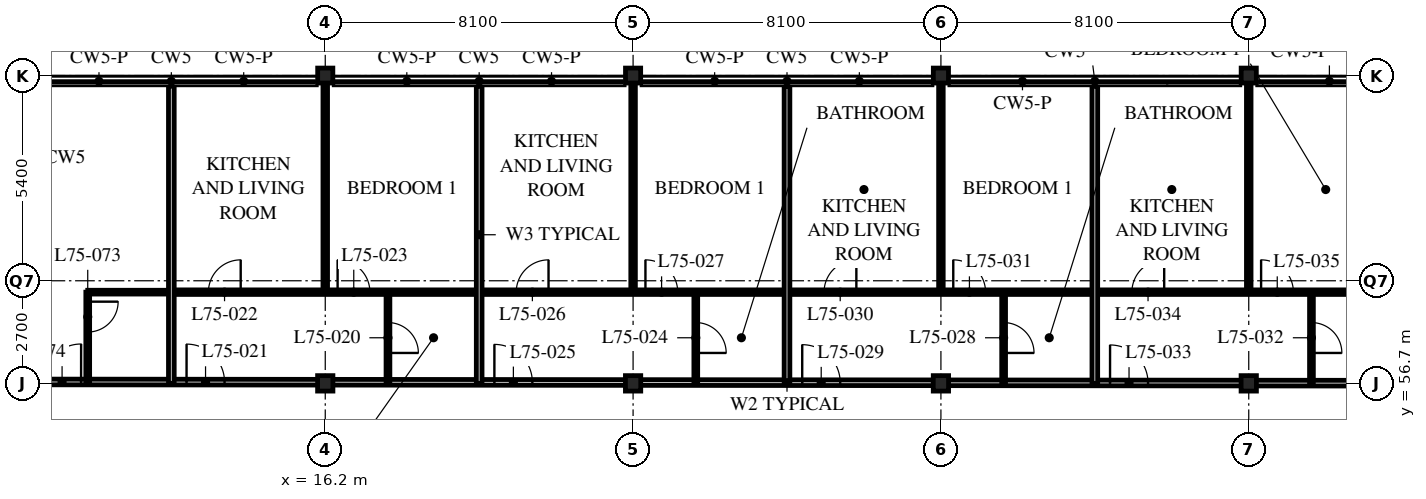
"""IFC4 building model, lengths in metres.
Left out: names, types, materials, properties, quantities, classifications, styles, units other than length and angle.
Written with IfcOpenShell. Run it as: python <this file> out.ifc"""

import sys

from ifc_helpers import new_model, si_unit, direction, frame, frame_2d, origin, origin_2d, place, context, subcontext, project, spatial, rectangle, i_section, extrude, element, fill, save


model = new_model("IFC4")
c1 = context("Model", 3, precision=1e-05, world=origin(), true_north=direction((0.0, 1.0)))
c2 = subcontext(c1, "Body", "Model", "MODEL_VIEW")
j1 = project(units=[si_unit("LENGTHUNIT", "METRE"), si_unit("PLANEANGLEUNIT", "RADIAN")], contexts=[c1])
p1 = place(None, origin())
s1 = spatial("IfcSite", under=j1, at=p1, CompositionType="ELEMENT")
p2 = place(p1, origin())
s2 = spatial("IfcBuilding", under=s1, at=p2, CompositionType="ELEMENT")
p3 = place(p2, frame((0.0, 0.0, 293.1)))
s3 = spatial("IfcBuildingStorey", under=s2, at=p3, CompositionType="ELEMENT", Elevation=293.1)
p4 = place(p3, frame((16.2, 56.7, 0.0), z_axis=(0.0, 0.0, 1.0), x_axis=(1.0, 0.0, 0.0)))
e1 = element("IfcColumn", 1, at=p4, inside=s3, PredefinedType="COLUMN", context=c2, shape_type="SweptSolid", body=[
    extrude(i_section(OverallWidth=0.403, OverallDepth=0.406, WebThickness=0.027, FlangeThickness=0.043, FilletRadius=0.015, at=origin_2d()), origin(), (0.0, 0.0, 1.0), 5.4),
])
p5 = place(p3, frame((16.2, 64.8, 0.0), z_axis=(0.0, 0.0, 1.0), x_axis=(1.0, 0.0, 0.0)))
e2 = element("IfcColumn", 2, at=p5, inside=s3, PredefinedType="COLUMN", context=c2, shape_type="SweptSolid", body=[
    extrude(i_section(OverallWidth=0.399, OverallDepth=0.394, WebThickness=0.023, FlangeThickness=0.037, FilletRadius=0.015, at=origin_2d()), origin(), (0.0, 0.0, 1.0), 5.4),
])
p6 = place(p3, frame((24.3, 56.7, 0.0), z_axis=(0.0, 0.0, 1.0), x_axis=(1.0, 0.0, 0.0)))
e3 = element("IfcColumn", 3, at=p6, inside=s3, PredefinedType="COLUMN", context=c2, shape_type="SweptSolid", body=[
    extrude(i_section(OverallWidth=0.403, OverallDepth=0.406, WebThickness=0.027, FlangeThickness=0.043, FilletRadius=0.015, at=origin_2d()), origin(), (0.0, 0.0, 1.0), 5.4),
])
p7 = place(p3, frame((24.3, 64.8, 0.0), z_axis=(0.0, 0.0, 1.0), x_axis=(1.0, 0.0, 0.0)))
e4 = element("IfcColumn", 4, at=p7, inside=s3, PredefinedType="COLUMN", context=c2, shape_type="SweptSolid", body=[
    extrude(i_section(OverallWidth=0.399, OverallDepth=0.394, WebThickness=0.023, FlangeThickness=0.037, FilletRadius=0.015, at=origin_2d()), origin(), (0.0, 0.0, 1.0), 5.4),
])
p8 = place(p3, frame((32.4, 56.7, 0.0), z_axis=(0.0, 0.0, 1.0), x_axis=(1.0, 0.0, 0.0)))
e5 = element("IfcColumn", 5, at=p8, inside=s3, PredefinedType="COLUMN", context=c2, shape_type="SweptSolid", body=[
    extrude(i_section(OverallWidth=0.403, OverallDepth=0.406, WebThickness=0.027, FlangeThickness=0.043, FilletRadius=0.015, at=origin_2d()), origin(), (0.0, 0.0, 1.0), 5.4),
])
p9 = place(p3, frame((32.4, 64.8, 0.0), z_axis=(0.0, 0.0, 1.0), x_axis=(1.0, 0.0, 0.0)))
e6 = element("IfcColumn", 6, at=p9, inside=s3, PredefinedType="COLUMN", context=c2, shape_type="SweptSolid", body=[
    extrude(i_section(OverallWidth=0.399, OverallDepth=0.394, WebThickness=0.023, FlangeThickness=0.037, FilletRadius=0.015, at=origin_2d()), origin(), (0.0, 0.0, 1.0), 5.4),
])
p10 = place(p3, frame((40.5, 56.7, 0.0), z_axis=(0.0, 0.0, 1.0), x_axis=(1.0, 0.0, 0.0)))
e7 = element("IfcColumn", 7, at=p10, inside=s3, PredefinedType="COLUMN", context=c2, shape_type="SweptSolid", body=[
    extrude(i_section(OverallWidth=0.403, OverallDepth=0.406, WebThickness=0.027, FlangeThickness=0.043, FilletRadius=0.015, at=origin_2d()), origin(), (0.0, 0.0, 1.0), 5.4),
])
p11 = place(p3, frame((40.5, 64.8, 0.0), z_axis=(0.0, 0.0, 1.0), x_axis=(1.0, 0.0, 0.0)))
e8 = element("IfcColumn", 8, at=p11, inside=s3, PredefinedType="COLUMN", context=c2, shape_type="SweptSolid", body=[
    extrude(i_section(OverallWidth=0.399, OverallDepth=0.394, WebThickness=0.023, FlangeThickness=0.037, FilletRadius=0.015, at=origin_2d()), origin(), (0.0, 0.0, 1.0), 5.4),
])
p12 = place(p3, frame((8.1, 56.738, 0.0), z_axis=(0.0, 0.0, 1.0), x_axis=(0.999999569095, -0.000928336791, 0.0)))
e9 = element("IfcWall", 9, at=p12, inside=s3, PredefinedType="PARTITIONING", context=c2, shape_type="SweptSolid", body=[
    extrude(rectangle(XDim=40.5, YDim=0.15, at=frame_2d((20.25, 0.0))), origin(), (0.0, 0.0, 1.0), 4.271),
])
p13 = place(p12, frame((4.45, 0.0, 0.0)))
e10 = element("IfcOpeningElement", 10, at=p13, cuts=e9, PredefinedType="OPENING", context=c2, shape_type="SweptSolid", body=[
    extrude(rectangle(XDim=1.0, YDim=2.1, at=frame_2d((0.5, 1.05))), frame((0.0, 0.085, 0.0), z_axis=(0.0, -1.0, 0.0), x_axis=(1.0, 0.0, 0.0)), (0.0, 0.0, 1.0), 0.17),
])
p14 = place(p12, frame((12.55, 0.0, 0.0)))
e11 = element("IfcOpeningElement", 11, at=p14, cuts=e9, PredefinedType="OPENING", context=c2, shape_type="SweptSolid", body=[
    extrude(rectangle(XDim=1.0, YDim=2.1, at=frame_2d((0.5, 1.05))), frame((0.0, 0.085, 0.0), z_axis=(0.0, -1.0, 0.0), x_axis=(1.0, 0.0, 0.0)), (0.0, 0.0, 1.0), 0.17),
])
p15 = place(p12, frame((20.65, 0.0, 0.0)))
e12 = element("IfcOpeningElement", 12, at=p15, cuts=e9, PredefinedType="OPENING", context=c2, shape_type="SweptSolid", body=[
    extrude(rectangle(XDim=1.0, YDim=2.1, at=frame_2d((0.5, 1.05))), frame((0.0, 0.085, 0.0), z_axis=(0.0, -1.0, 0.0), x_axis=(1.0, 0.0, 0.0)), (0.0, 0.0, 1.0), 0.17),
])
p16 = place(p12, frame((28.75, 0.0, 0.0)))
e13 = element("IfcOpeningElement", 13, at=p16, cuts=e9, PredefinedType="OPENING", context=c2, shape_type="SweptSolid", body=[
    extrude(rectangle(XDim=1.0, YDim=2.1, at=frame_2d((0.5, 1.05))), frame((0.0, 0.085, 0.0), z_axis=(0.0, -1.0, 0.0), x_axis=(1.0, 0.0, 0.0)), (0.0, 0.0, 1.0), 0.17),
])
p17 = place(p12, frame((38.825, 0.0, 0.0)))
e14 = element("IfcOpeningElement", 14, at=p17, cuts=e9, PredefinedType="OPENING", context=c2, shape_type="SweptSolid", body=[
    extrude(rectangle(XDim=1.0, YDim=2.1, at=frame_2d((0.5, 1.05))), frame((0.0, 0.085, 0.0), z_axis=(0.0, -1.0, 0.0), x_axis=(1.0, 0.0, 0.0)), (0.0, 0.0, 1.0), 0.17),
])
p18 = place(p12, frame((0.675, 0.0, 0.0)))
e15 = element("IfcOpeningElement", 15, at=p18, cuts=e9, PredefinedType="OPENING", context=c2, shape_type="SweptSolid", body=[
    extrude(rectangle(XDim=1.0, YDim=2.1, at=frame_2d((0.5, 1.05))), frame((0.0, 0.085, 0.0), z_axis=(0.0, -1.0, 0.0), x_axis=(1.0, 0.0, 0.0)), (0.0, 0.0, 1.0), 0.17),
])
p19 = place(p3, frame((12.15, 59.1, 0.0), z_axis=(0.0, 0.0, 1.0), x_axis=(1.0, 0.0, 0.0)))
e16 = element("IfcWall", 16, at=p19, inside=s3, PredefinedType="PARTITIONING", context=c2, shape_type="SweptSolid", body=[
    extrude(rectangle(XDim=32.352, YDim=0.12, at=frame_2d((16.176, 0.0))), origin(), (0.0, 0.0, 1.0), 5.19),
])
p20 = place(p19, frame((0.975, 0.0, 0.0)))
e17 = element("IfcOpeningElement", 17, at=p20, cuts=e16, PredefinedType="OPENING", context=c2, shape_type="SweptSolid", body=[
    extrude(rectangle(XDim=0.85, YDim=2.1, at=frame_2d((0.425, 1.05))), frame((0.0, 0.07, 0.0), z_axis=(0.0, -1.0, 0.0), x_axis=(1.0, 0.0, 0.0)), (0.0, 0.0, 1.0), 0.14),
])
p21 = place(p19, frame((4.375, 0.0, 0.0)))
e18 = element("IfcOpeningElement", 18, at=p21, cuts=e16, PredefinedType="OPENING", context=c2, shape_type="SweptSolid", body=[
    extrude(rectangle(XDim=0.85, YDim=2.1, at=frame_2d((0.425, 1.05))), frame((0.0, 0.07, 0.0), z_axis=(0.0, -1.0, 0.0), x_axis=(1.0, 0.0, 0.0)), (0.0, 0.0, 1.0), 0.14),
])
p22 = place(p19, frame((9.075, 0.0, 0.0)))
e19 = element("IfcOpeningElement", 19, at=p22, cuts=e16, PredefinedType="OPENING", context=c2, shape_type="SweptSolid", body=[
    extrude(rectangle(XDim=0.85, YDim=2.1, at=frame_2d((0.425, 1.05))), frame((0.0, 0.07, 0.0), z_axis=(0.0, -1.0, 0.0), x_axis=(1.0, 0.0, 0.0)), (0.0, 0.0, 1.0), 0.14),
])
p23 = place(p19, frame((12.475, 0.0, 0.0)))
e20 = element("IfcOpeningElement", 20, at=p23, cuts=e16, PredefinedType="OPENING", context=c2, shape_type="SweptSolid", body=[
    extrude(rectangle(XDim=0.85, YDim=2.1, at=frame_2d((0.425, 1.05))), frame((0.0, 0.07, 0.0), z_axis=(0.0, -1.0, 0.0), x_axis=(1.0, 0.0, 0.0)), (0.0, 0.0, 1.0), 0.14),
])
p24 = place(p19, frame((17.175, 0.0, 0.0)))
e21 = element("IfcOpeningElement", 21, at=p24, cuts=e16, PredefinedType="OPENING", context=c2, shape_type="SweptSolid", body=[
    extrude(rectangle(XDim=0.85, YDim=2.1, at=frame_2d((0.425, 1.05))), frame((0.0, 0.07, 0.0), z_axis=(0.0, -1.0, 0.0), x_axis=(1.0, 0.0, 0.0)), (0.0, 0.0, 1.0), 0.14),
])
p25 = place(p19, frame((20.575, 0.0, 0.0)))
e22 = element("IfcOpeningElement", 22, at=p25, cuts=e16, PredefinedType="OPENING", context=c2, shape_type="SweptSolid", body=[
    extrude(rectangle(XDim=0.85, YDim=2.1, at=frame_2d((0.425, 1.05))), frame((0.0, 0.07, 0.0), z_axis=(0.0, -1.0, 0.0), x_axis=(1.0, 0.0, 0.0)), (0.0, 0.0, 1.0), 0.14),
])
p26 = place(p19, frame((25.275, 0.0, 0.0)))
e23 = element("IfcOpeningElement", 23, at=p26, cuts=e16, PredefinedType="OPENING", context=c2, shape_type="SweptSolid", body=[
    extrude(rectangle(XDim=0.85, YDim=2.1, at=frame_2d((0.425, 1.05))), frame((0.0, 0.07, 0.0), z_axis=(0.0, -1.0, 0.0), x_axis=(1.0, 0.0, 0.0)), (0.0, 0.0, 1.0), 0.14),
])
p27 = place(p19, frame((28.675, 0.0, 0.0)))
e24 = element("IfcOpeningElement", 24, at=p27, cuts=e16, PredefinedType="OPENING", context=c2, shape_type="SweptSolid", body=[
    extrude(rectangle(XDim=0.85, YDim=2.1, at=frame_2d((0.425, 1.05))), frame((0.0, 0.07, 0.0), z_axis=(0.0, -1.0, 0.0), x_axis=(1.0, 0.0, 0.0)), (0.0, 0.0, 1.0), 0.14),
])
p28 = place(p3, frame((17.85, 56.7, 0.0), z_axis=(0.0, 0.0, 1.0), x_axis=(0.0, 1.0, 0.0)))
e25 = element("IfcWall", 25, at=p28, inside=s3, PredefinedType="PARTITIONING", context=c2, shape_type="SweptSolid", body=[
    extrude(rectangle(XDim=2.4, YDim=0.1, at=frame_2d((1.2, 0.0))), origin(), (0.0, 0.0, 1.0), 5.19),
])
p29 = place(p28, frame((0.8, 0.0, 0.0)))
e26 = element("IfcOpeningElement", 26, at=p29, cuts=e25, PredefinedType="OPENING", context=c2, shape_type="SweptSolid", body=[
    extrude(rectangle(XDim=0.8, YDim=2.1, at=frame_2d((0.4, 1.05))), frame((0.0, 0.06, 0.0), z_axis=(0.0, -1.0, 0.0), x_axis=(1.0, 0.0, 0.0)), (0.0, 0.0, 1.0), 0.12),
])
p30 = place(p3, frame((16.2, 59.1, 0.0), z_axis=(0.0, 0.0, 1.0), x_axis=(0.0, 1.0, 0.0)))
e27 = element("IfcWall", 27, at=p30, inside=s3, PredefinedType="PARTITIONING", context=c2, shape_type="SweptSolid", body=[
    extrude(rectangle(XDim=5.4, YDim=0.12, at=frame_2d((2.7, 0.0))), origin(), (0.0, 0.0, 1.0), 4.271),
])
p31 = place(p3, frame((20.25, 56.7, 0.0), z_axis=(0.0, 0.0, 1.0), x_axis=(0.0, 1.0, 0.0)))
e28 = element("IfcWall", 28, at=p31, inside=s3, PredefinedType="PARTITIONING", context=c2, shape_type="SweptSolid", body=[
    extrude(rectangle(XDim=7.822, YDim=0.15, at=frame_2d((3.911, 0.0))), origin(), (0.0, 0.0, 1.0), 5.19),
])
p32 = place(p3, frame((25.95, 56.7, 0.0), z_axis=(0.0, 0.0, 1.0), x_axis=(0.0, 1.0, 0.0)))
e29 = element("IfcWall", 29, at=p32, inside=s3, PredefinedType="PARTITIONING", context=c2, shape_type="SweptSolid", body=[
    extrude(rectangle(XDim=2.4, YDim=0.1, at=frame_2d((1.2, 0.0))), origin(), (0.0, 0.0, 1.0), 5.19),
])
p33 = place(p32, frame((0.8, 0.0, 0.0)))
e30 = element("IfcOpeningElement", 30, at=p33, cuts=e29, PredefinedType="OPENING", context=c2, shape_type="SweptSolid", body=[
    extrude(rectangle(XDim=0.8, YDim=2.1, at=frame_2d((0.4, 1.05))), frame((0.0, 0.06, 0.0), z_axis=(0.0, -1.0, 0.0), x_axis=(1.0, 0.0, 0.0)), (0.0, 0.0, 1.0), 0.12),
])
p34 = place(p3, frame((24.3, 59.1, 0.0), z_axis=(0.0, 0.0, 1.0), x_axis=(0.0, 1.0, 0.0)))
e31 = element("IfcWall", 31, at=p34, inside=s3, PredefinedType="PARTITIONING", context=c2, shape_type="SweptSolid", body=[
    extrude(rectangle(XDim=5.4, YDim=0.12, at=frame_2d((2.7, 0.0))), origin(), (0.0, 0.0, 1.0), 4.271),
])
p35 = place(p3, frame((28.35, 56.7, 0.0), z_axis=(0.0, 0.0, 1.0), x_axis=(0.0, 1.0, 0.0)))
e32 = element("IfcWall", 32, at=p35, inside=s3, PredefinedType="PARTITIONING", context=c2, shape_type="SweptSolid", body=[
    extrude(rectangle(XDim=7.822, YDim=0.15, at=frame_2d((3.911, 0.0))), origin(), (0.0, 0.0, 1.0), 5.19),
])
p36 = place(p3, frame((34.05, 56.7, 0.0), z_axis=(0.0, 0.0, 1.0), x_axis=(0.0, 1.0, 0.0)))
e33 = element("IfcWall", 33, at=p36, inside=s3, PredefinedType="PARTITIONING", context=c2, shape_type="SweptSolid", body=[
    extrude(rectangle(XDim=2.4, YDim=0.1, at=frame_2d((1.2, 0.0))), origin(), (0.0, 0.0, 1.0), 5.19),
])
p37 = place(p36, frame((0.8, 0.0, 0.0)))
e34 = element("IfcOpeningElement", 34, at=p37, cuts=e33, PredefinedType="OPENING", context=c2, shape_type="SweptSolid", body=[
    extrude(rectangle(XDim=0.8, YDim=2.1, at=frame_2d((0.4, 1.05))), frame((0.0, 0.06, 0.0), z_axis=(0.0, -1.0, 0.0), x_axis=(1.0, 0.0, 0.0)), (0.0, 0.0, 1.0), 0.12),
])
p38 = place(p3, frame((32.4, 59.1, 0.0), z_axis=(0.0, 0.0, 1.0), x_axis=(0.0, 1.0, 0.0)))
e35 = element("IfcWall", 35, at=p38, inside=s3, PredefinedType="PARTITIONING", context=c2, shape_type="SweptSolid", body=[
    extrude(rectangle(XDim=5.4, YDim=0.12, at=frame_2d((2.7, 0.0))), origin(), (0.0, 0.0, 1.0), 4.271),
])
p39 = place(p3, frame((36.45, 56.7, 0.0), z_axis=(0.0, 0.0, 1.0), x_axis=(0.0, 1.0, 0.0)))
e36 = element("IfcWall", 36, at=p39, inside=s3, PredefinedType="PARTITIONING", context=c2, shape_type="SweptSolid", body=[
    extrude(rectangle(XDim=7.822, YDim=0.15, at=frame_2d((3.911, 0.0))), origin(), (0.0, 0.0, 1.0), 5.19),
])
p40 = place(p3, frame((42.15, 56.7, 0.0), z_axis=(0.0, 0.0, 1.0), x_axis=(0.0, 1.0, 0.0)))
e37 = element("IfcWall", 37, at=p40, inside=s3, PredefinedType="PARTITIONING", context=c2, shape_type="SweptSolid", body=[
    extrude(rectangle(XDim=2.4, YDim=0.1, at=frame_2d((1.2, 0.0))), origin(), (0.0, 0.0, 1.0), 5.19),
])
p41 = place(p40, frame((0.8, 0.0, 0.0)))
e38 = element("IfcOpeningElement", 38, at=p41, cuts=e37, PredefinedType="OPENING", context=c2, shape_type="SweptSolid", body=[
    extrude(rectangle(XDim=0.8, YDim=2.1, at=frame_2d((0.4, 1.05))), frame((0.0, 0.06, 0.0), z_axis=(0.0, -1.0, 0.0), x_axis=(1.0, 0.0, 0.0)), (0.0, 0.0, 1.0), 0.12),
])
p42 = place(p3, frame((40.5, 59.1, 0.0), z_axis=(0.0, 0.0, 1.0), x_axis=(0.0, 1.0, 0.0)))
e39 = element("IfcWall", 39, at=p42, inside=s3, PredefinedType="PARTITIONING", context=c2, shape_type="SweptSolid", body=[
    extrude(rectangle(XDim=5.4, YDim=0.12, at=frame_2d((2.7, 0.0))), origin(), (0.0, 0.0, 1.0), 4.271),
])
p43 = place(p3, frame((9.95, 59.1, 0.0), z_axis=(0.0, 0.0, 1.0), x_axis=(1.0, 0.0, 0.0)))
e40 = element("IfcWall", 40, at=p43, inside=s3, PredefinedType="PARTITIONING", context=c2, shape_type="SweptSolid", body=[
    extrude(rectangle(XDim=2.2, YDim=0.1, at=frame_2d((1.1, 0.0))), origin(), (0.0, 0.0, 1.0), 5.19),
])
p44 = place(p3, frame((9.95, 56.7, 0.0), z_axis=(0.0, 0.0, 1.0), x_axis=(0.0, 1.0, 0.0)))
e41 = element("IfcWall", 41, at=p44, inside=s3, PredefinedType="PARTITIONING", context=c2, shape_type="SweptSolid", body=[
    extrude(rectangle(XDim=2.4, YDim=0.1, at=frame_2d((1.2, 0.0))), origin(), (0.0, 0.0, 1.0), 5.19),
])
p45 = place(p44, frame((1.35, 0.0, 0.0)))
e42 = element("IfcOpeningElement", 42, at=p45, cuts=e41, PredefinedType="OPENING", context=c2, shape_type="SweptSolid", body=[
    extrude(rectangle(XDim=0.8, YDim=2.1, at=frame_2d((0.4, 1.05))), frame((0.0, 0.06, 0.0), z_axis=(0.0, -1.0, 0.0), x_axis=(1.0, 0.0, 0.0)), (0.0, 0.0, 1.0), 0.12),
])
p46 = place(p3, frame((12.15, 56.7, 0.0), z_axis=(0.0, 0.0, 1.0), x_axis=(0.0, 1.0, 0.0)))
e43 = element("IfcWall", 43, at=p46, inside=s3, PredefinedType="PARTITIONING", context=c2, shape_type="SweptSolid", body=[
    extrude(rectangle(XDim=7.822, YDim=0.15, at=frame_2d((3.911, 0.0))), origin(), (0.0, 0.0, 1.0), 5.19),
])
p47 = place(p29, origin())
e44 = element("IfcDoor", 44, at=p47, inside=s3, OperationType="SINGLE_SWING_RIGHT", PredefinedType="DOOR", context=c2, shape_type="SweptSolid", body=[
    extrude(rectangle(XDim=0.8, YDim=2.1, at=frame_2d((0.4, 1.05))), frame((0.0, 0.025, 0.0), z_axis=(0.0, -1.0, 0.0), x_axis=(1.0, 0.0, 0.0)), (0.0, 0.0, 1.0), 0.05),
])
fill(e26, e44)
p48 = place(p13, origin())
e45 = element("IfcDoor", 45, at=p48, inside=s3, OperationType="SINGLE_SWING_LEFT", PredefinedType="DOOR", context=c2, shape_type="SweptSolid", body=[
    extrude(rectangle(XDim=1.0, YDim=2.1, at=frame_2d((0.5, 1.05))), frame((0.0, 0.025, 0.0), z_axis=(0.0, -1.0, 0.0), x_axis=(1.0, 0.0, 0.0)), (0.0, 0.0, 1.0), 0.05),
])
fill(e10, e45)
p49 = place(p20, origin())
e46 = element("IfcDoor", 46, at=p49, inside=s3, OperationType="SINGLE_SWING_RIGHT", PredefinedType="DOOR", context=c2, shape_type="SweptSolid", body=[
    extrude(rectangle(XDim=0.85, YDim=2.1, at=frame_2d((0.425, 1.05))), frame((0.0, 0.025, 0.0), z_axis=(0.0, -1.0, 0.0), x_axis=(1.0, 0.0, 0.0)), (0.0, 0.0, 1.0), 0.05),
])
fill(e17, e46)
p50 = place(p21, origin())
e47 = element("IfcDoor", 47, at=p50, inside=s3, OperationType="SINGLE_SWING_LEFT", PredefinedType="DOOR", context=c2, shape_type="SweptSolid", body=[
    extrude(rectangle(XDim=0.85, YDim=2.1, at=frame_2d((0.425, 1.05))), frame((0.0, 0.025, 0.0), z_axis=(0.0, -1.0, 0.0), x_axis=(1.0, 0.0, 0.0)), (0.0, 0.0, 1.0), 0.05),
])
fill(e18, e47)
p51 = place(p33, origin())
e48 = element("IfcDoor", 48, at=p51, inside=s3, OperationType="SINGLE_SWING_RIGHT", PredefinedType="DOOR", context=c2, shape_type="SweptSolid", body=[
    extrude(rectangle(XDim=0.8, YDim=2.1, at=frame_2d((0.4, 1.05))), frame((0.0, 0.025, 0.0), z_axis=(0.0, -1.0, 0.0), x_axis=(1.0, 0.0, 0.0)), (0.0, 0.0, 1.0), 0.05),
])
fill(e30, e48)
p52 = place(p14, origin())
e49 = element("IfcDoor", 49, at=p52, inside=s3, OperationType="SINGLE_SWING_LEFT", PredefinedType="DOOR", context=c2, shape_type="SweptSolid", body=[
    extrude(rectangle(XDim=1.0, YDim=2.1, at=frame_2d((0.5, 1.05))), frame((0.0, 0.025, 0.0), z_axis=(0.0, -1.0, 0.0), x_axis=(1.0, 0.0, 0.0)), (0.0, 0.0, 1.0), 0.05),
])
fill(e11, e49)
p53 = place(p22, origin())
e50 = element("IfcDoor", 50, at=p53, inside=s3, OperationType="SINGLE_SWING_RIGHT", PredefinedType="DOOR", context=c2, shape_type="SweptSolid", body=[
    extrude(rectangle(XDim=0.85, YDim=2.1, at=frame_2d((0.425, 1.05))), frame((0.0, 0.025, 0.0), z_axis=(0.0, -1.0, 0.0), x_axis=(1.0, 0.0, 0.0)), (0.0, 0.0, 1.0), 0.05),
])
fill(e19, e50)
p54 = place(p23, origin())
e51 = element("IfcDoor", 51, at=p54, inside=s3, OperationType="SINGLE_SWING_LEFT", PredefinedType="DOOR", context=c2, shape_type="SweptSolid", body=[
    extrude(rectangle(XDim=0.85, YDim=2.1, at=frame_2d((0.425, 1.05))), frame((0.0, 0.025, 0.0), z_axis=(0.0, -1.0, 0.0), x_axis=(1.0, 0.0, 0.0)), (0.0, 0.0, 1.0), 0.05),
])
fill(e20, e51)
p55 = place(p37, origin())
e52 = element("IfcDoor", 52, at=p55, inside=s3, OperationType="SINGLE_SWING_RIGHT", PredefinedType="DOOR", context=c2, shape_type="SweptSolid", body=[
    extrude(rectangle(XDim=0.8, YDim=2.1, at=frame_2d((0.4, 1.05))), frame((0.0, 0.025, 0.0), z_axis=(0.0, -1.0, 0.0), x_axis=(1.0, 0.0, 0.0)), (0.0, 0.0, 1.0), 0.05),
])
fill(e34, e52)
p56 = place(p15, origin())
e53 = element("IfcDoor", 53, at=p56, inside=s3, OperationType="SINGLE_SWING_LEFT", PredefinedType="DOOR", context=c2, shape_type="SweptSolid", body=[
    extrude(rectangle(XDim=1.0, YDim=2.1, at=frame_2d((0.5, 1.05))), frame((0.0, 0.025, 0.0), z_axis=(0.0, -1.0, 0.0), x_axis=(1.0, 0.0, 0.0)), (0.0, 0.0, 1.0), 0.05),
])
fill(e12, e53)
p57 = place(p24, origin())
e54 = element("IfcDoor", 54, at=p57, inside=s3, OperationType="SINGLE_SWING_RIGHT", PredefinedType="DOOR", context=c2, shape_type="SweptSolid", body=[
    extrude(rectangle(XDim=0.85, YDim=2.1, at=frame_2d((0.425, 1.05))), frame((0.0, 0.025, 0.0), z_axis=(0.0, -1.0, 0.0), x_axis=(1.0, 0.0, 0.0)), (0.0, 0.0, 1.0), 0.05),
])
fill(e21, e54)
p58 = place(p25, origin())
e55 = element("IfcDoor", 55, at=p58, inside=s3, OperationType="SINGLE_SWING_LEFT", PredefinedType="DOOR", context=c2, shape_type="SweptSolid", body=[
    extrude(rectangle(XDim=0.85, YDim=2.1, at=frame_2d((0.425, 1.05))), frame((0.0, 0.025, 0.0), z_axis=(0.0, -1.0, 0.0), x_axis=(1.0, 0.0, 0.0)), (0.0, 0.0, 1.0), 0.05),
])
fill(e22, e55)
p59 = place(p41, origin())
e56 = element("IfcDoor", 56, at=p59, inside=s3, OperationType="SINGLE_SWING_RIGHT", PredefinedType="DOOR", context=c2, shape_type="SweptSolid", body=[
    extrude(rectangle(XDim=0.8, YDim=2.1, at=frame_2d((0.4, 1.05))), frame((0.0, 0.025, 0.0), z_axis=(0.0, -1.0, 0.0), x_axis=(1.0, 0.0, 0.0)), (0.0, 0.0, 1.0), 0.05),
])
fill(e38, e56)
p60 = place(p16, origin())
e57 = element("IfcDoor", 57, at=p60, inside=s3, OperationType="SINGLE_SWING_LEFT", PredefinedType="DOOR", context=c2, shape_type="SweptSolid", body=[
    extrude(rectangle(XDim=1.0, YDim=2.1, at=frame_2d((0.5, 1.05))), frame((0.0, 0.025, 0.0), z_axis=(0.0, -1.0, 0.0), x_axis=(1.0, 0.0, 0.0)), (0.0, 0.0, 1.0), 0.05),
])
fill(e13, e57)
p61 = place(p26, origin())
e58 = element("IfcDoor", 58, at=p61, inside=s3, OperationType="SINGLE_SWING_RIGHT", PredefinedType="DOOR", context=c2, shape_type="SweptSolid", body=[
    extrude(rectangle(XDim=0.85, YDim=2.1, at=frame_2d((0.425, 1.05))), frame((0.0, 0.025, 0.0), z_axis=(0.0, -1.0, 0.0), x_axis=(1.0, 0.0, 0.0)), (0.0, 0.0, 1.0), 0.05),
])
fill(e23, e58)
p62 = place(p27, origin())
e59 = element("IfcDoor", 59, at=p62, inside=s3, OperationType="SINGLE_SWING_LEFT", PredefinedType="DOOR", context=c2, shape_type="SweptSolid", body=[
    extrude(rectangle(XDim=0.85, YDim=2.1, at=frame_2d((0.425, 1.05))), frame((0.0, 0.025, 0.0), z_axis=(0.0, -1.0, 0.0), x_axis=(1.0, 0.0, 0.0)), (0.0, 0.0, 1.0), 0.05),
])
fill(e24, e59)
p63 = place(p45, origin())
e60 = element("IfcDoor", 60, at=p63, inside=s3, OperationType="SINGLE_SWING_LEFT", PredefinedType="DOOR", context=c2, shape_type="SweptSolid", body=[
    extrude(rectangle(XDim=0.8, YDim=2.1, at=frame_2d((0.4, 1.05))), frame((0.0, 0.025, 0.0), z_axis=(0.0, -1.0, 0.0), x_axis=(1.0, 0.0, 0.0)), (0.0, 0.0, 1.0), 0.05),
])
fill(e42, e60)
p64 = place(p18, origin())
e61 = element("IfcDoor", 61, at=p64, inside=s3, OperationType="SINGLE_SWING_RIGHT", PredefinedType="DOOR", context=c2, shape_type="SweptSolid", body=[
    extrude(rectangle(XDim=1.0, YDim=2.1, at=frame_2d((0.5, 1.05))), frame((0.0, 0.025, 0.0), z_axis=(0.0, -1.0, 0.0), x_axis=(1.0, 0.0, 0.0)), (0.0, 0.0, 1.0), 0.05),
])
fill(e15, e61)
save(model, sys.argv[1])
